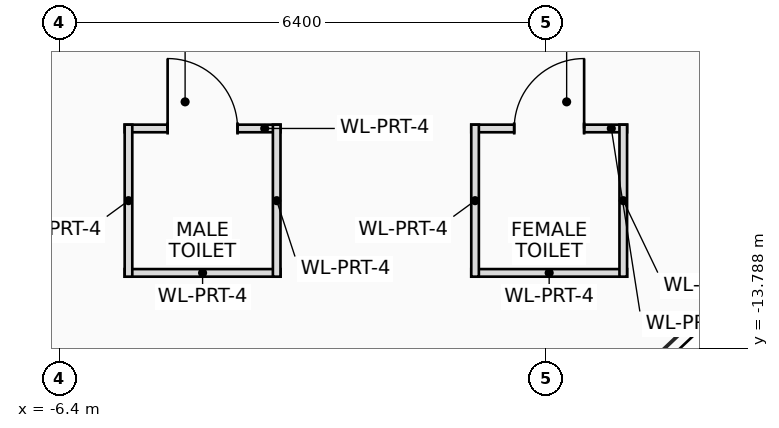
"""IFC4 building model, lengths in metres.
Left out: names, types, materials, properties, quantities, classifications, styles, units other than length and angle.
Written with IfcOpenShell. Run it as: python <this file> out.ifc"""

import sys

from ifc_helpers import new_model, si_unit, direction, frame, frame_2d, origin, place, context, subcontext, project, spatial, rectangle, extrude, element, fill, save


model = new_model("IFC4")
c1 = context("Model", 3, precision=1e-05, world=origin(), true_north=direction((0.0, 1.0)))
c2 = subcontext(c1, "Body", "Model", "MODEL_VIEW")
j1 = project(units=[si_unit("LENGTHUNIT", "METRE"), si_unit("PLANEANGLEUNIT", "RADIAN")], contexts=[c1])
p1 = place(None, origin())
s1 = spatial("IfcSite", under=j1, at=p1, CompositionType="ELEMENT")
p2 = place(p1, origin())
s2 = spatial("IfcBuilding", under=s1, at=p2, CompositionType="ELEMENT")
p3 = place(p2, frame((0.0, 0.0, 224.15)))
s3 = spatial("IfcBuildingStorey", under=s2, at=p3, CompositionType="ELEMENT", Elevation=224.15)
p4 = place(p3, frame((-5.543, -10.894, 0.0), z_axis=(0.0, 0.0, 1.0), x_axis=(1.0, 0.0, 0.0)))
e1 = element("IfcWall", 1, at=p4, inside=s3, PredefinedType="PARTITIONING", context=c2, shape_type="SweptSolid", body=[
    extrude(rectangle(XDim=2.05, YDim=0.1, at=frame_2d((1.025, 0.0))), origin(), (0.0, 0.0, 1.0), 3.705),
])
p5 = place(p4, frame((0.565, 0.0, 0.0)))
e2 = element("IfcOpeningElement", 2, at=p5, cuts=e1, PredefinedType="OPENING", context=c2, shape_type="SweptSolid", body=[
    extrude(rectangle(XDim=0.92, YDim=2.1, at=frame_2d((0.46, 1.05))), frame((0.0, 0.06, 0.0), z_axis=(0.0, -1.0, 0.0), x_axis=(1.0, 0.0, 0.0)), (0.0, 0.0, 1.0), 0.12),
])
p6 = place(p3, frame((-3.493, -12.794, 0.0), z_axis=(0.0, 0.0, 1.0), x_axis=(-1.0, 0.0, 0.0)))
e3 = element("IfcWall", 3, at=p6, inside=s3, PredefinedType="PARTITIONING", context=c2, shape_type="SweptSolid", body=[
    extrude(rectangle(XDim=2.05, YDim=0.1, at=frame_2d((1.025, 0.0))), origin(), (0.0, 0.0, 1.0), 3.705),
])
for number, where, z_axis, x_axis in (
    (4, (-3.543, -10.844, 0.0), (0.0, 0.0, 1.0), (0.0, -1.0, 0.0)),
    (5, (-5.493, -12.844, 0.0), (0.0, 0.0, 1.0), (0.0, 1.0, 0.0)),
):
    element("IfcWall", number, at=place(p3, frame(where, z_axis=z_axis, x_axis=x_axis)), inside=s3, PredefinedType="PARTITIONING", context=c2, shape_type="SweptSolid", body=[
        extrude(rectangle(XDim=2.0, YDim=0.1, at=frame_2d((1.0, 0.0))), origin(), (0.0, 0.0, 1.0), 3.905),
    ])
p7 = place(p3, frame((-0.983, -10.894, 0.0), z_axis=(0.0, 0.0, 1.0), x_axis=(1.0, 0.0, 0.0)))
e6 = element("IfcWall", 6, at=p7, inside=s3, PredefinedType="PARTITIONING", context=c2, shape_type="SweptSolid", body=[
    extrude(rectangle(XDim=2.05, YDim=0.1, at=frame_2d((1.025, 0.0))), origin(), (0.0, 0.0, 1.0), 4.3),
])
p8 = place(p7, frame((0.565, 0.0, 0.0)))
e7 = element("IfcOpeningElement", 7, at=p8, cuts=e6, PredefinedType="OPENING", context=c2, shape_type="SweptSolid", body=[
    extrude(rectangle(XDim=0.92, YDim=2.1, at=frame_2d((0.46, 1.05))), frame((0.0, 0.06, 0.0), z_axis=(0.0, -1.0, 0.0), x_axis=(1.0, 0.0, 0.0)), (0.0, 0.0, 1.0), 0.12),
])
p9 = place(p3, frame((1.067, -12.794, 0.0), z_axis=(0.0, 0.0, 1.0), x_axis=(-1.0, 0.0, 0.0)))
e8 = element("IfcWall", 8, at=p9, inside=s3, PredefinedType="PARTITIONING", context=c2, shape_type="SweptSolid", body=[
    extrude(rectangle(XDim=2.05, YDim=0.1, at=frame_2d((1.025, 0.0))), origin(), (0.0, 0.0, 1.0), 4.3),
])
for number, where, z_axis, x_axis in (
    (9, (1.017, -10.844, 0.0), (0.0, 0.0, 1.0), (0.0, -1.0, 0.0)),
    (10, (-0.933, -12.844, 0.0), (0.0, 0.0, 1.0), (0.0, 1.0, 0.0)),
):
    element("IfcWall", number, at=place(p3, frame(where, z_axis=z_axis, x_axis=x_axis)), inside=s3, PredefinedType="PARTITIONING", context=c2, shape_type="SweptSolid", body=[
        extrude(rectangle(XDim=2.0, YDim=0.1, at=frame_2d((1.0, 0.0))), origin(), (0.0, 0.0, 1.0), 3.955),
    ])
p10 = place(p5, origin())
e11 = element("IfcDoor", 11, at=p10, inside=s3, OperationType="SINGLE_SWING_LEFT", PredefinedType="DOOR", context=c2, shape_type="SweptSolid", body=[
    extrude(rectangle(XDim=0.92, YDim=2.1, at=frame_2d((0.46, 1.05))), frame((0.0, 0.025, 0.0), z_axis=(0.0, -1.0, 0.0), x_axis=(1.0, 0.0, 0.0)), (0.0, 0.0, 1.0), 0.05),
])
fill(e2, e11)
p11 = place(p8, origin())
e12 = element("IfcDoor", 12, at=p11, inside=s3, OperationType="SINGLE_SWING_RIGHT", PredefinedType="DOOR", context=c2, shape_type="SweptSolid", body=[
    extrude(rectangle(XDim=0.92, YDim=2.1, at=frame_2d((0.46, 1.05))), frame((0.0, 0.025, 0.0), z_axis=(0.0, -1.0, 0.0), x_axis=(1.0, 0.0, 0.0)), (0.0, 0.0, 1.0), 0.05),
])
fill(e7, e12)
save(model, sys.argv[1])
